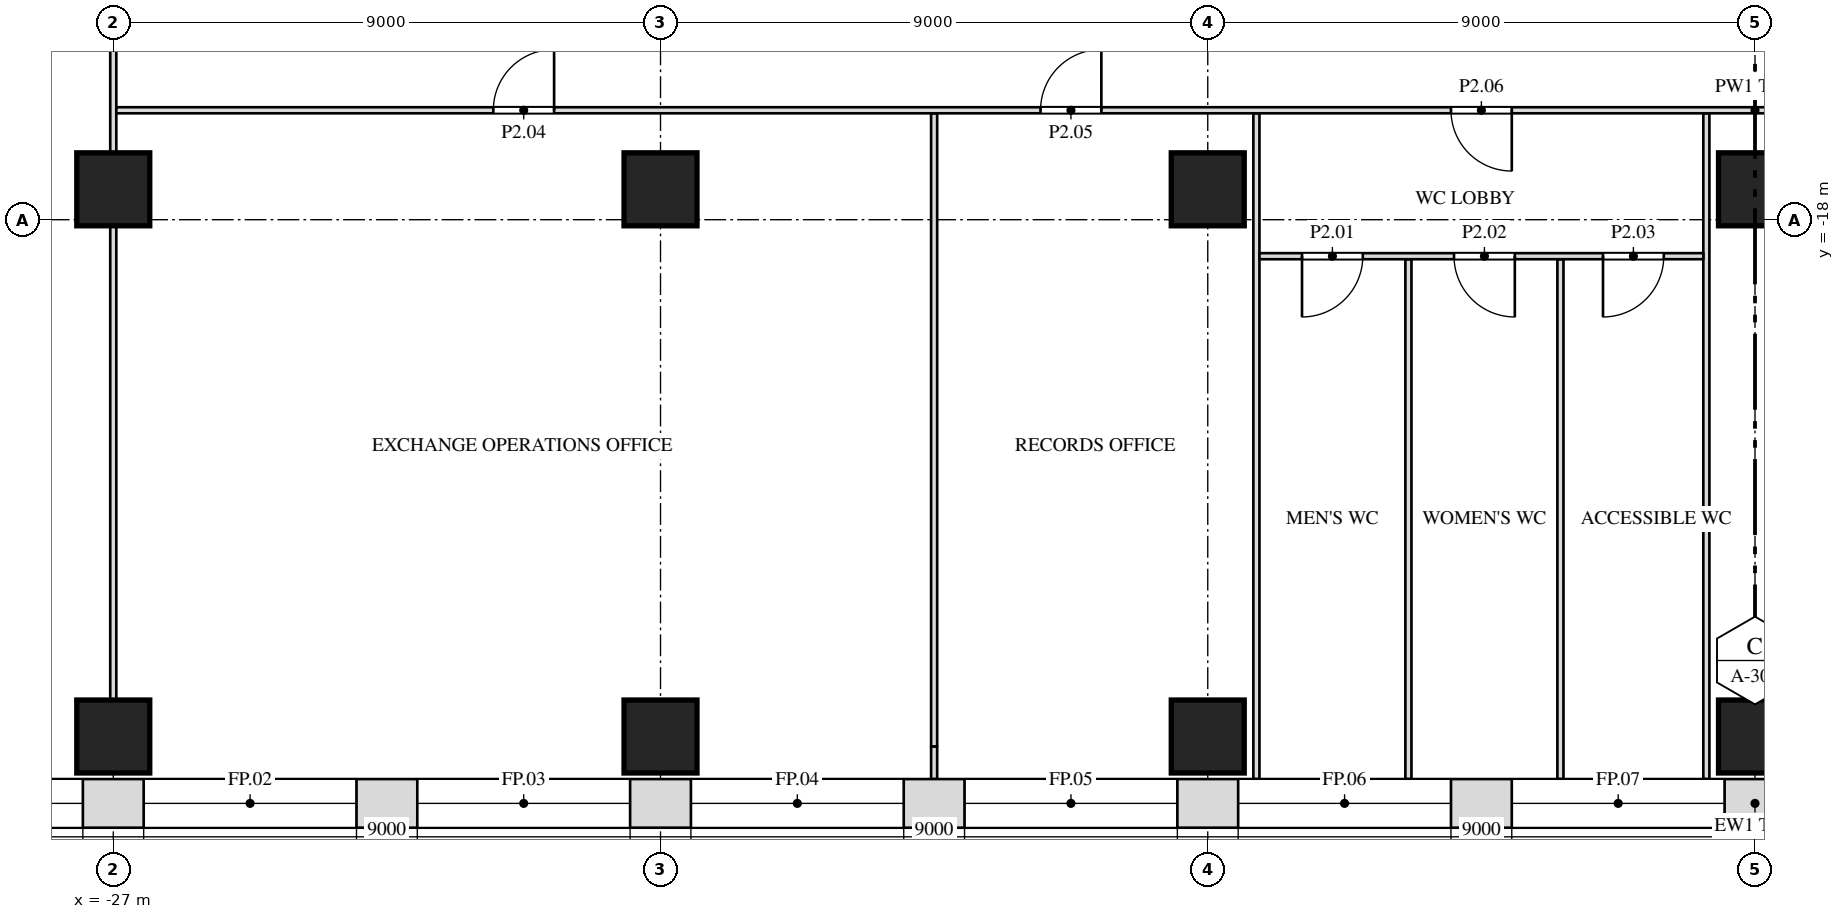
"""IFC4 building model, lengths in metres.
Left out: names, types, materials, properties, quantities, classifications, styles, units other than length and angle.
Written with IfcOpenShell. Run it as: python <this file> out.ifc"""

import sys

from ifc_helpers import new_model, si_unit, direction, frame, frame_2d, origin, origin_2d, place, context, subcontext, project, spatial, rectangle, extrude, element, fill, save


model = new_model("IFC4")
c1 = context("Model", 3, precision=1e-05, world=origin(), true_north=direction((0.0, 1.0)))
c2 = subcontext(c1, "Body", "Model", "MODEL_VIEW")
j1 = project(units=[si_unit("LENGTHUNIT", "METRE"), si_unit("PLANEANGLEUNIT", "RADIAN")], contexts=[c1])
p1 = place(None, origin())
s1 = spatial("IfcSite", under=j1, at=p1, CompositionType="ELEMENT")
p2 = place(p1, origin())
s2 = spatial("IfcBuilding", under=s1, at=p2, CompositionType="ELEMENT")
p3 = place(p2, frame((0.0, 0.0, 15.0)))
s3 = spatial("IfcBuildingStorey", under=s2, at=p3, CompositionType="ELEMENT", Elevation=15.0)
for number, where, z_axis, x_axis in (
    (1, (-27.0, -26.5, 0.0), (0.0, 0.0, 1.0), (1.0, 0.0, 0.0)),
    (2, (-18.0, -26.5, 0.0), (0.0, 0.0, 1.0), (1.0, 0.0, 0.0)),
    (3, (-9.0, -26.5, 0.0), (0.0, 0.0, 1.0), (1.0, 0.0, 0.0)),
    (4, (0.0, -26.5, 0.0), (0.0, 0.0, 1.0), (1.0, 0.0, 0.0)),
    (5, (-27.0, -17.5, 0.0), (0.0, 0.0, 1.0), (1.0, 0.0, 0.0)),
    (6, (-18.0, -17.5, 0.0), (0.0, 0.0, 1.0), (1.0, 0.0, 0.0)),
    (7, (-9.0, -17.5, 0.0), (0.0, 0.0, 1.0), (1.0, 0.0, 0.0)),
    (8, (0.0, -17.5, 0.0), (0.0, 0.0, 1.0), (1.0, 0.0, 0.0)),
):
    element("IfcColumn", number, at=place(p3, frame(where, z_axis=z_axis, x_axis=x_axis)), inside=s3, PredefinedType="COLUMN", context=c2, shape_type="SweptSolid", body=[
        extrude(rectangle(XDim=1.2, YDim=1.2, at=origin_2d()), origin(), (0.0, 0.0, 1.0), 6.0),
    ])
p4 = place(p3, frame((-27.0, -25.9, 0.0), z_axis=(0.0, 0.0, 1.0), x_axis=(0.0, 1.0, 0.0)))
e9 = element("IfcWall", 9, at=p4, inside=s3, PredefinedType="PARTITIONING", context=c2, shape_type="SweptSolid", body=[
    extrude(rectangle(XDim=7.8, YDim=0.1, at=frame_2d((3.9, 0.0))), origin(), (0.0, 0.0, 1.0), 5.088),
])
p5 = place(p3, frame((-27.0, -16.9, 0.0), z_axis=(0.0, 0.0, 1.0), x_axis=(0.0, 1.0, 0.0)))
e10 = element("IfcWall", 10, at=p5, inside=s3, PredefinedType="PARTITIONING", context=c2, shape_type="SweptSolid", body=[
    extrude(rectangle(XDim=2.85, YDim=0.1, at=frame_2d((1.425, 0.0))), origin(), (0.0, 0.0, 1.0), 5.088),
])
p6 = place(p3, frame((-13.5, -27.2, 0.0), z_axis=(0.0, 0.0, 1.0), x_axis=(0.0, 1.0, 0.0)))
e11 = element("IfcWall", 11, at=p6, inside=s3, PredefinedType="PARTITIONING", context=c2, shape_type="SweptSolid", body=[
    extrude(rectangle(XDim=0.537, YDim=0.1, at=frame_2d((0.269, 0.0))), origin(), (0.0, 0.0, 1.0), 5.7),
])
p7 = place(p3, frame((-13.5, -26.663, 0.0), z_axis=(0.0, 0.0, 1.0), x_axis=(0.0, 1.0, 0.0)))
e12 = element("IfcWall", 12, at=p7, inside=s3, PredefinedType="PARTITIONING", context=c2, shape_type="SweptSolid", body=[
    extrude(rectangle(XDim=10.413, YDim=0.1, at=frame_2d((5.206, 0.0))), origin(), (0.0, 0.0, 1.0), 5.088),
])
p8 = place(p3, frame((-8.2, -27.2, 0.0), z_axis=(0.0, 0.0, 1.0), x_axis=(0.0, 1.0, 0.0)))
e13 = element("IfcWall", 13, at=p8, inside=s3, PredefinedType="PARTITIONING", context=c2, shape_type="SweptSolid", body=[
    extrude(rectangle(XDim=10.95, YDim=0.1, at=frame_2d((5.475, 0.0))), origin(), (0.0, 0.0, 1.0), 5.7),
])
for number, where, z_axis, x_axis in (
    (14, (-5.7, -27.2, 0.0), (0.0, 0.0, 1.0), (0.0, 1.0, 0.0)),
    (15, (-3.2, -27.2, 0.0), (0.0, 0.0, 1.0), (0.0, 1.0, 0.0)),
):
    element("IfcWall", number, at=place(p3, frame(where, z_axis=z_axis, x_axis=x_axis)), inside=s3, PredefinedType="PARTITIONING", context=c2, shape_type="SweptSolid", body=[
        extrude(rectangle(XDim=8.55, YDim=0.1, at=frame_2d((4.275, 0.0))), origin(), (0.0, 0.0, 1.0), 5.7),
    ])
p9 = place(p3, frame((-0.8, -27.2, 0.0), z_axis=(0.0, 0.0, 1.0), x_axis=(0.0, 1.0, 0.0)))
e16 = element("IfcWall", 16, at=p9, inside=s3, PredefinedType="PARTITIONING", context=c2, shape_type="SweptSolid", body=[
    extrude(rectangle(XDim=10.95, YDim=0.1, at=frame_2d((5.475, 0.0))), origin(), (0.0, 0.0, 1.0), 5.7),
])
p10 = place(p3, frame((-8.15, -18.6, 0.0), z_axis=(0.0, 0.0, 1.0), x_axis=(1.0, 0.0, 0.0)))
e17 = element("IfcWall", 17, at=p10, inside=s3, PredefinedType="PARTITIONING", context=c2, shape_type="SweptSolid", body=[
    extrude(rectangle(XDim=7.3, YDim=0.1, at=frame_2d((3.65, 0.0))), origin(), (0.0, 0.0, 1.0), 5.7),
])
p11 = place(p10, frame((0.7, 0.0, 0.0)))
e18 = element("IfcOpeningElement", 18, at=p11, cuts=e17, PredefinedType="OPENING", context=c2, shape_type="SweptSolid", body=[
    extrude(rectangle(XDim=1.0, YDim=2.1, at=frame_2d((0.5, 1.05))), frame((0.0, 0.062, 0.0), z_axis=(0.0, -1.0, 0.0), x_axis=(1.0, 0.0, 0.0)), (0.0, 0.0, 1.0), 0.124),
])
p12 = place(p10, frame((3.2, 0.0, 0.0)))
e19 = element("IfcOpeningElement", 19, at=p12, cuts=e17, PredefinedType="OPENING", context=c2, shape_type="SweptSolid", body=[
    extrude(rectangle(XDim=1.0, YDim=2.1, at=frame_2d((0.5, 1.05))), frame((0.0, 0.062, 0.0), z_axis=(0.0, -1.0, 0.0), x_axis=(1.0, 0.0, 0.0)), (0.0, 0.0, 1.0), 0.124),
])
p13 = place(p10, frame((5.65, 0.0, 0.0)))
e20 = element("IfcOpeningElement", 20, at=p13, cuts=e17, PredefinedType="OPENING", context=c2, shape_type="SweptSolid", body=[
    extrude(rectangle(XDim=1.0, YDim=2.1, at=frame_2d((0.5, 1.05))), frame((0.0, 0.062, 0.0), z_axis=(0.0, -1.0, 0.0), x_axis=(1.0, 0.0, 0.0)), (0.0, 0.0, 1.0), 0.124),
])
p14 = place(p3, frame((-26.95, -16.2, 0.0), z_axis=(0.0, 0.0, 1.0), x_axis=(1.0, 0.0, 0.0)))
e21 = element("IfcWall", 21, at=p14, inside=s3, PredefinedType="PARTITIONING", context=c2, shape_type="SweptSolid", body=[
    extrude(rectangle(XDim=53.9, YDim=0.1, at=frame_2d((26.95, 0.0))), origin(), (0.0, 0.0, 1.0), 5.7),
])
p15 = place(p14, frame((6.2, 0.0, 0.0)))
e22 = element("IfcOpeningElement", 22, at=p15, cuts=e21, PredefinedType="OPENING", context=c2, shape_type="SweptSolid", body=[
    extrude(rectangle(XDim=1.0, YDim=2.1, at=frame_2d((0.5, 1.05))), frame((0.0, 0.062, 0.0), z_axis=(0.0, -1.0, 0.0), x_axis=(1.0, 0.0, 0.0)), (0.0, 0.0, 1.0), 0.124),
])
p16 = place(p14, frame((15.2, 0.0, 0.0)))
e23 = element("IfcOpeningElement", 23, at=p16, cuts=e21, PredefinedType="OPENING", context=c2, shape_type="SweptSolid", body=[
    extrude(rectangle(XDim=1.0, YDim=2.1, at=frame_2d((0.5, 1.05))), frame((0.0, 0.062, 0.0), z_axis=(0.0, -1.0, 0.0), x_axis=(1.0, 0.0, 0.0)), (0.0, 0.0, 1.0), 0.124),
])
p17 = place(p14, frame((21.95, 0.0, 0.0)))
e24 = element("IfcOpeningElement", 24, at=p17, cuts=e21, PredefinedType="OPENING", context=c2, shape_type="SweptSolid", body=[
    extrude(rectangle(XDim=1.0, YDim=2.1, at=frame_2d((0.5, 1.05))), frame((0.0, 0.062, 0.0), z_axis=(0.0, -1.0, 0.0), x_axis=(1.0, 0.0, 0.0)), (0.0, 0.0, 1.0), 0.124),
])
p18 = place(p14, frame((30.95, 0.0, 0.0)))
e25 = element("IfcOpeningElement", 25, at=p18, cuts=e21, PredefinedType="OPENING", context=c2, shape_type="SweptSolid", body=[
    extrude(rectangle(XDim=1.0, YDim=2.1, at=frame_2d((0.5, 1.05))), frame((0.0, 0.062, 0.0), z_axis=(0.0, -1.0, 0.0), x_axis=(1.0, 0.0, 0.0)), (0.0, 0.0, 1.0), 0.124),
])
p19 = place(p14, frame((39.95, 0.0, 0.0)))
e26 = element("IfcOpeningElement", 26, at=p19, cuts=e21, PredefinedType="OPENING", context=c2, shape_type="SweptSolid", body=[
    extrude(rectangle(XDim=1.0, YDim=2.1, at=frame_2d((0.5, 1.05))), frame((0.0, 0.062, 0.0), z_axis=(0.0, -1.0, 0.0), x_axis=(1.0, 0.0, 0.0)), (0.0, 0.0, 1.0), 0.124),
])
p20 = place(p14, frame((48.95, 0.0, 0.0)))
e27 = element("IfcOpeningElement", 27, at=p20, cuts=e21, PredefinedType="OPENING", context=c2, shape_type="SweptSolid", body=[
    extrude(rectangle(XDim=1.0, YDim=2.1, at=frame_2d((0.5, 1.05))), frame((0.0, 0.062, 0.0), z_axis=(0.0, -1.0, 0.0), x_axis=(1.0, 0.0, 0.0)), (0.0, 0.0, 1.0), 0.124),
])
p21 = place(p3, frame((-32.948, -27.6, 0.0), z_axis=(0.0, 0.0, 1.0), x_axis=(1.0, 0.0, 0.0)))
e28 = element("IfcWall", 28, at=p21, inside=s3, PredefinedType="SOLIDWALL", context=c2, shape_type="SweptSolid", body=[
    extrude(rectangle(XDim=65.895, YDim=0.8, at=frame_2d((32.948, 0.0))), origin(), (0.0, 0.0, 1.0), 5.7),
])
p22 = place(p21, frame((1.948, 0.0, 1.0)))
e29 = element("IfcOpeningElement", 29, at=p22, cuts=e28, PredefinedType="OPENING", context=c2, shape_type="SweptSolid", body=[
    extrude(rectangle(XDim=3.5, YDim=4.0, at=frame_2d((1.75, 2.0))), frame((0.0, 0.412, 0.0), z_axis=(0.0, -1.0, 0.0), x_axis=(1.0, 0.0, 0.0)), (0.0, 0.0, 1.0), 0.824),
])
p23 = place(p21, frame((6.448, 0.0, 1.0)))
e30 = element("IfcOpeningElement", 30, at=p23, cuts=e28, PredefinedType="OPENING", context=c2, shape_type="SweptSolid", body=[
    extrude(rectangle(XDim=3.5, YDim=4.0, at=frame_2d((1.75, 2.0))), frame((0.0, 0.412, 0.0), z_axis=(0.0, -1.0, 0.0), x_axis=(1.0, 0.0, 0.0)), (0.0, 0.0, 1.0), 0.824),
])
p24 = place(p21, frame((10.948, 0.0, 1.0)))
e31 = element("IfcOpeningElement", 31, at=p24, cuts=e28, PredefinedType="OPENING", context=c2, shape_type="SweptSolid", body=[
    extrude(rectangle(XDim=3.5, YDim=4.0, at=frame_2d((1.75, 2.0))), frame((0.0, 0.412, 0.0), z_axis=(0.0, -1.0, 0.0), x_axis=(1.0, 0.0, 0.0)), (0.0, 0.0, 1.0), 0.824),
])
p25 = place(p21, frame((15.448, 0.0, 1.0)))
e32 = element("IfcOpeningElement", 32, at=p25, cuts=e28, PredefinedType="OPENING", context=c2, shape_type="SweptSolid", body=[
    extrude(rectangle(XDim=3.5, YDim=4.0, at=frame_2d((1.75, 2.0))), frame((0.0, 0.412, 0.0), z_axis=(0.0, -1.0, 0.0), x_axis=(1.0, 0.0, 0.0)), (0.0, 0.0, 1.0), 0.824),
])
p26 = place(p21, frame((19.948, 0.0, 1.0)))
e33 = element("IfcOpeningElement", 33, at=p26, cuts=e28, PredefinedType="OPENING", context=c2, shape_type="SweptSolid", body=[
    extrude(rectangle(XDim=3.5, YDim=4.0, at=frame_2d((1.75, 2.0))), frame((0.0, 0.412, 0.0), z_axis=(0.0, -1.0, 0.0), x_axis=(1.0, 0.0, 0.0)), (0.0, 0.0, 1.0), 0.824),
])
p27 = place(p21, frame((24.448, 0.0, 1.0)))
e34 = element("IfcOpeningElement", 34, at=p27, cuts=e28, PredefinedType="OPENING", context=c2, shape_type="SweptSolid", body=[
    extrude(rectangle(XDim=3.5, YDim=4.0, at=frame_2d((1.75, 2.0))), frame((0.0, 0.412, 0.0), z_axis=(0.0, -1.0, 0.0), x_axis=(1.0, 0.0, 0.0)), (0.0, 0.0, 1.0), 0.824),
])
p28 = place(p21, frame((28.948, 0.0, 1.0)))
e35 = element("IfcOpeningElement", 35, at=p28, cuts=e28, PredefinedType="OPENING", context=c2, shape_type="SweptSolid", body=[
    extrude(rectangle(XDim=3.5, YDim=4.0, at=frame_2d((1.75, 2.0))), frame((0.0, 0.412, 0.0), z_axis=(0.0, -1.0, 0.0), x_axis=(1.0, 0.0, 0.0)), (0.0, 0.0, 1.0), 0.824),
])
p29 = place(p21, frame((33.448, 0.0, 1.0)))
e36 = element("IfcOpeningElement", 36, at=p29, cuts=e28, PredefinedType="OPENING", context=c2, shape_type="SweptSolid", body=[
    extrude(rectangle(XDim=3.5, YDim=4.0, at=frame_2d((1.75, 2.0))), frame((0.0, 0.412, 0.0), z_axis=(0.0, -1.0, 0.0), x_axis=(1.0, 0.0, 0.0)), (0.0, 0.0, 1.0), 0.824),
])
p30 = place(p21, frame((37.948, 0.0, 1.0)))
e37 = element("IfcOpeningElement", 37, at=p30, cuts=e28, PredefinedType="OPENING", context=c2, shape_type="SweptSolid", body=[
    extrude(rectangle(XDim=3.5, YDim=4.0, at=frame_2d((1.75, 2.0))), frame((0.0, 0.412, 0.0), z_axis=(0.0, -1.0, 0.0), x_axis=(1.0, 0.0, 0.0)), (0.0, 0.0, 1.0), 0.824),
])
p31 = place(p21, frame((42.448, 0.0, 1.0)))
e38 = element("IfcOpeningElement", 38, at=p31, cuts=e28, PredefinedType="OPENING", context=c2, shape_type="SweptSolid", body=[
    extrude(rectangle(XDim=3.5, YDim=4.0, at=frame_2d((1.75, 2.0))), frame((0.0, 0.412, 0.0), z_axis=(0.0, -1.0, 0.0), x_axis=(1.0, 0.0, 0.0)), (0.0, 0.0, 1.0), 0.824),
])
p32 = place(p21, frame((46.948, 0.0, 1.0)))
e39 = element("IfcOpeningElement", 39, at=p32, cuts=e28, PredefinedType="OPENING", context=c2, shape_type="SweptSolid", body=[
    extrude(rectangle(XDim=3.5, YDim=4.0, at=frame_2d((1.75, 2.0))), frame((0.0, 0.412, 0.0), z_axis=(0.0, -1.0, 0.0), x_axis=(1.0, 0.0, 0.0)), (0.0, 0.0, 1.0), 0.824),
])
p33 = place(p21, frame((51.448, 0.0, 1.0)))
e40 = element("IfcOpeningElement", 40, at=p33, cuts=e28, PredefinedType="OPENING", context=c2, shape_type="SweptSolid", body=[
    extrude(rectangle(XDim=3.5, YDim=4.0, at=frame_2d((1.75, 2.0))), frame((0.0, 0.412, 0.0), z_axis=(0.0, -1.0, 0.0), x_axis=(1.0, 0.0, 0.0)), (0.0, 0.0, 1.0), 0.824),
])
p34 = place(p21, frame((55.948, 0.0, 1.0)))
e41 = element("IfcOpeningElement", 41, at=p34, cuts=e28, PredefinedType="OPENING", context=c2, shape_type="SweptSolid", body=[
    extrude(rectangle(XDim=3.5, YDim=4.0, at=frame_2d((1.75, 2.0))), frame((0.0, 0.412, 0.0), z_axis=(0.0, -1.0, 0.0), x_axis=(1.0, 0.0, 0.0)), (0.0, 0.0, 1.0), 0.824),
])
p35 = place(p21, frame((60.448, 0.0, 1.0)))
e42 = element("IfcOpeningElement", 42, at=p35, cuts=e28, PredefinedType="OPENING", context=c2, shape_type="SweptSolid", body=[
    extrude(rectangle(XDim=3.5, YDim=4.0, at=frame_2d((1.75, 2.0))), frame((0.0, 0.412, 0.0), z_axis=(0.0, -1.0, 0.0), x_axis=(1.0, 0.0, 0.0)), (0.0, 0.0, 1.0), 0.824),
])
p36 = place(p11, origin())
e43 = element("IfcDoor", 43, at=p36, inside=s3, OperationType="SINGLE_SWING_RIGHT", PredefinedType="DOOR", context=c2, shape_type="SweptSolid", body=[
    extrude(rectangle(XDim=1.0, YDim=2.1, at=frame_2d((0.5, 1.05))), frame((0.0, 0.025, 0.0), z_axis=(0.0, -1.0, 0.0), x_axis=(1.0, 0.0, 0.0)), (0.0, 0.0, 1.0), 0.05),
])
fill(e18, e43)
p37 = place(p12, origin())
e44 = element("IfcDoor", 44, at=p37, inside=s3, OperationType="SINGLE_SWING_LEFT", PredefinedType="DOOR", context=c2, shape_type="SweptSolid", body=[
    extrude(rectangle(XDim=1.0, YDim=2.1, at=frame_2d((0.5, 1.05))), frame((0.0, 0.025, 0.0), z_axis=(0.0, -1.0, 0.0), x_axis=(1.0, 0.0, 0.0)), (0.0, 0.0, 1.0), 0.05),
])
fill(e19, e44)
p38 = place(p13, origin())
e45 = element("IfcDoor", 45, at=p38, inside=s3, OperationType="SINGLE_SWING_RIGHT", PredefinedType="DOOR", context=c2, shape_type="SweptSolid", body=[
    extrude(rectangle(XDim=1.0, YDim=2.1, at=frame_2d((0.5, 1.05))), frame((0.0, 0.025, 0.0), z_axis=(0.0, -1.0, 0.0), x_axis=(1.0, 0.0, 0.0)), (0.0, 0.0, 1.0), 0.05),
])
fill(e20, e45)
p39 = place(p15, origin())
e46 = element("IfcDoor", 46, at=p39, inside=s3, OperationType="SINGLE_SWING_RIGHT", PredefinedType="DOOR", context=c2, shape_type="SweptSolid", body=[
    extrude(rectangle(XDim=1.0, YDim=2.1, at=frame_2d((0.5, 1.05))), frame((0.0, 0.025, 0.0), z_axis=(0.0, -1.0, 0.0), x_axis=(1.0, 0.0, 0.0)), (0.0, 0.0, 1.0), 0.05),
])
fill(e22, e46)
p40 = place(p16, origin())
e47 = element("IfcDoor", 47, at=p40, inside=s3, OperationType="SINGLE_SWING_RIGHT", PredefinedType="DOOR", context=c2, shape_type="SweptSolid", body=[
    extrude(rectangle(XDim=1.0, YDim=2.1, at=frame_2d((0.5, 1.05))), frame((0.0, 0.025, 0.0), z_axis=(0.0, -1.0, 0.0), x_axis=(1.0, 0.0, 0.0)), (0.0, 0.0, 1.0), 0.05),
])
fill(e23, e47)
p41 = place(p17, origin())
e48 = element("IfcDoor", 48, at=p41, inside=s3, OperationType="SINGLE_SWING_LEFT", PredefinedType="DOOR", context=c2, shape_type="SweptSolid", body=[
    extrude(rectangle(XDim=1.0, YDim=2.1, at=frame_2d((0.5, 1.05))), frame((0.0, 0.025, 0.0), z_axis=(0.0, -1.0, 0.0), x_axis=(1.0, 0.0, 0.0)), (0.0, 0.0, 1.0), 0.05),
])
fill(e24, e48)
p42 = place(p22, origin())
e49 = element("IfcWindow", 49, at=p42, inside=s3, PartitioningType="SINGLE_PANEL", PredefinedType="WINDOW", context=c2, shape_type="SweptSolid", body=[
    extrude(rectangle(XDim=3.5, YDim=4.0, at=frame_2d((1.75, 2.0))), frame((0.0, 0.03, 0.0), z_axis=(0.0, -1.0, 0.0), x_axis=(1.0, 0.0, 0.0)), (0.0, 0.0, 1.0), 0.06),
])
fill(e29, e49)
p43 = place(p23, origin())
e50 = element("IfcWindow", 50, at=p43, inside=s3, PartitioningType="SINGLE_PANEL", PredefinedType="WINDOW", context=c2, shape_type="SweptSolid", body=[
    extrude(rectangle(XDim=3.5, YDim=4.0, at=frame_2d((1.75, 2.0))), frame((0.0, 0.03, 0.0), z_axis=(0.0, -1.0, 0.0), x_axis=(1.0, 0.0, 0.0)), (0.0, 0.0, 1.0), 0.06),
])
fill(e30, e50)
p44 = place(p24, origin())
e51 = element("IfcWindow", 51, at=p44, inside=s3, PartitioningType="SINGLE_PANEL", PredefinedType="WINDOW", context=c2, shape_type="SweptSolid", body=[
    extrude(rectangle(XDim=3.5, YDim=4.0, at=frame_2d((1.75, 2.0))), frame((0.0, 0.03, 0.0), z_axis=(0.0, -1.0, 0.0), x_axis=(1.0, 0.0, 0.0)), (0.0, 0.0, 1.0), 0.06),
])
fill(e31, e51)
p45 = place(p25, origin())
e52 = element("IfcWindow", 52, at=p45, inside=s3, PartitioningType="SINGLE_PANEL", PredefinedType="WINDOW", context=c2, shape_type="SweptSolid", body=[
    extrude(rectangle(XDim=3.5, YDim=4.0, at=frame_2d((1.75, 2.0))), frame((0.0, 0.03, 0.0), z_axis=(0.0, -1.0, 0.0), x_axis=(1.0, 0.0, 0.0)), (0.0, 0.0, 1.0), 0.06),
])
fill(e32, e52)
p46 = place(p26, origin())
e53 = element("IfcWindow", 53, at=p46, inside=s3, PartitioningType="SINGLE_PANEL", PredefinedType="WINDOW", context=c2, shape_type="SweptSolid", body=[
    extrude(rectangle(XDim=3.5, YDim=4.0, at=frame_2d((1.75, 2.0))), frame((0.0, 0.03, 0.0), z_axis=(0.0, -1.0, 0.0), x_axis=(1.0, 0.0, 0.0)), (0.0, 0.0, 1.0), 0.06),
])
fill(e33, e53)
p47 = place(p27, origin())
e54 = element("IfcWindow", 54, at=p47, inside=s3, PartitioningType="SINGLE_PANEL", PredefinedType="WINDOW", context=c2, shape_type="SweptSolid", body=[
    extrude(rectangle(XDim=3.5, YDim=4.0, at=frame_2d((1.75, 2.0))), frame((0.0, 0.03, 0.0), z_axis=(0.0, -1.0, 0.0), x_axis=(1.0, 0.0, 0.0)), (0.0, 0.0, 1.0), 0.06),
])
fill(e34, e54)
p48 = place(p28, origin())
e55 = element("IfcWindow", 55, at=p48, inside=s3, PartitioningType="SINGLE_PANEL", PredefinedType="WINDOW", context=c2, shape_type="SweptSolid", body=[
    extrude(rectangle(XDim=3.5, YDim=4.0, at=frame_2d((1.75, 2.0))), frame((0.0, 0.03, 0.0), z_axis=(0.0, -1.0, 0.0), x_axis=(1.0, 0.0, 0.0)), (0.0, 0.0, 1.0), 0.06),
])
fill(e35, e55)
save(model, sys.argv[1])
